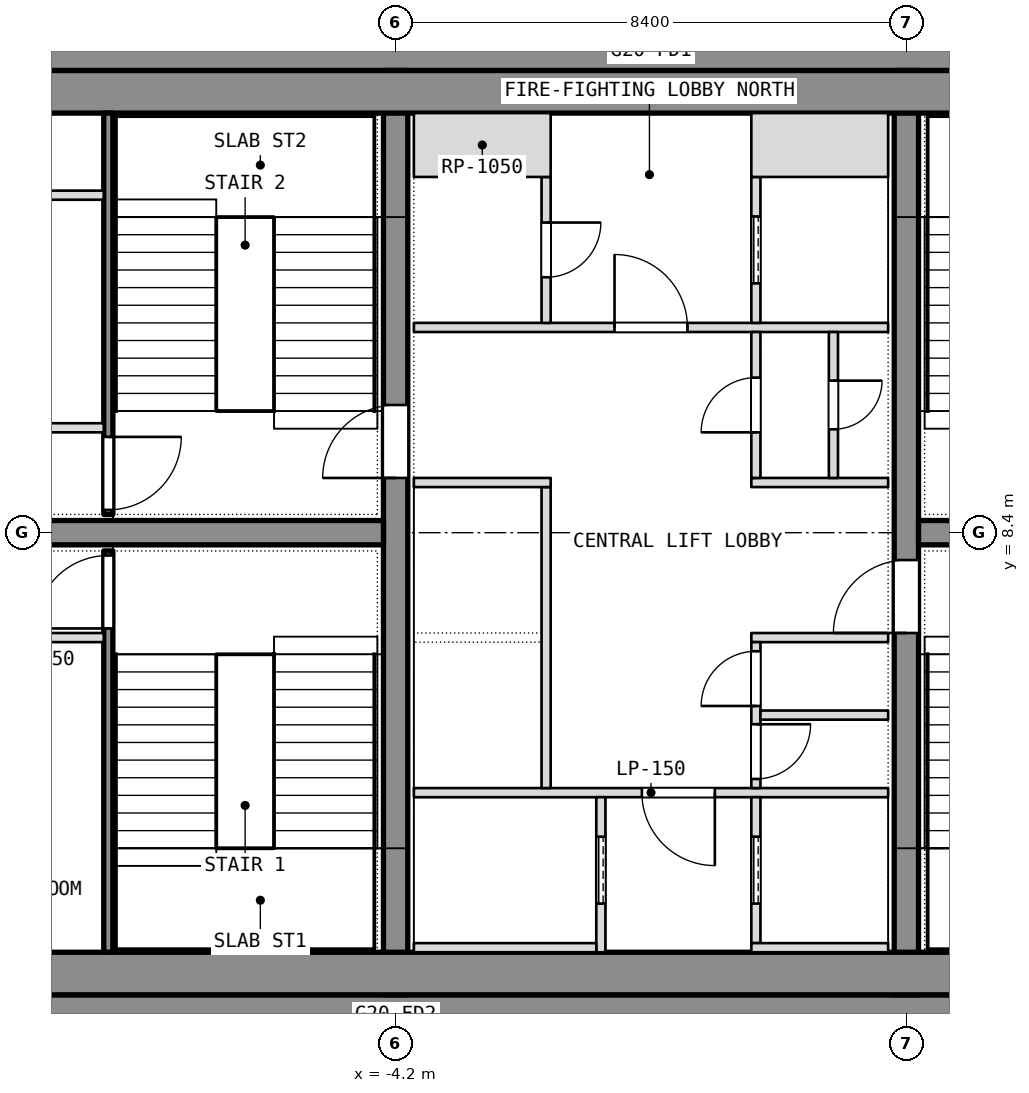
"""IFC4 building model, lengths in metres.
Left out: names, types, materials, properties, quantities, classifications, styles, units other than length and angle.
Written with IfcOpenShell. Run it as: python <this file> out.ifc"""

import sys

from ifc_helpers import new_model, si_unit, direction, frame, frame_2d, origin, place, context, subcontext, project, spatial, rectangle, extrude, element, fill, save


model = new_model("IFC4")
c1 = context("Model", 3, precision=1e-05, world=origin(), true_north=direction((0.0, 1.0)))
c2 = subcontext(c1, "Body", "Model", "MODEL_VIEW")
j1 = project(units=[si_unit("LENGTHUNIT", "METRE"), si_unit("PLANEANGLEUNIT", "RADIAN")], contexts=[c1])
p1 = place(None, origin())
s1 = spatial("IfcSite", under=j1, at=p1, CompositionType="ELEMENT")
p2 = place(p1, origin())
s2 = spatial("IfcBuilding", under=s1, at=p2, CompositionType="ELEMENT")
p3 = place(p2, frame((0.0, 0.0, 230.9)))
s3 = spatial("IfcBuildingStorey", under=s2, at=p3, CompositionType="ELEMENT", Elevation=230.9)
for number, where, z_axis, x_axis in (
    (1, (-11.1, 0.4, 0.0), (0.0, 0.0, 1.0), (1.0, 0.0, 0.0)),
    (2, (-11.1, 16.4, 0.0), (0.0, 0.0, 1.0), (1.0, 0.0, 0.0)),
):
    element("IfcWall", number, at=place(p3, frame(where, z_axis=z_axis, x_axis=x_axis)), inside=s3, PredefinedType="SHEAR", context=c2, shape_type="SweptSolid", body=[
        extrude(rectangle(XDim=22.2, YDim=0.8, at=frame_2d((11.1, 0.0))), origin(), (0.0, 0.0, 1.0), 3.6),
    ])
p4 = place(p3, frame((-4.2, 0.8, 0.0), z_axis=(0.0, 0.0, 1.0), x_axis=(0.0, 1.0, 0.0)))
e3 = element("IfcWall", 3, at=p4, inside=s3, PredefinedType="SHEAR", context=c2, shape_type="SweptSolid", body=[
    extrude(rectangle(XDim=15.2, YDim=0.4, at=frame_2d((7.6, 0.0))), origin(), (0.0, 0.0, 1.0), 3.6),
])
p5 = place(p4, frame((8.5, 0.0, 0.0)))
e4 = element("IfcOpeningElement", 4, at=p5, cuts=e3, PredefinedType="OPENING", context=c2, shape_type="SweptSolid", body=[
    extrude(rectangle(XDim=1.2, YDim=2.1, at=frame_2d((0.6, 1.05))), frame((0.0, 0.2, 0.0), z_axis=(0.0, -1.0, 0.0), x_axis=(1.0, 0.0, 0.0)), (0.0, 0.0, 1.0), 0.4),
])
p6 = place(p3, frame((4.2, 0.8, 0.0), z_axis=(0.0, 0.0, 1.0), x_axis=(0.0, 1.0, 0.0)))
e5 = element("IfcWall", 5, at=p6, inside=s3, PredefinedType="SHEAR", context=c2, shape_type="SweptSolid", body=[
    extrude(rectangle(XDim=15.2, YDim=0.4, at=frame_2d((7.6, 0.0))), origin(), (0.0, 0.0, 1.0), 3.6),
])
p7 = place(p6, frame((5.95, 0.0, 0.0)))
e6 = element("IfcOpeningElement", 6, at=p7, cuts=e5, PredefinedType="OPENING", context=c2, shape_type="SweptSolid", body=[
    extrude(rectangle(XDim=1.2, YDim=2.1, at=frame_2d((0.6, 1.05))), frame((0.0, 0.2, 0.0), z_axis=(0.0, -1.0, 0.0), x_axis=(1.0, 0.0, 0.0)), (0.0, 0.0, 1.0), 0.4),
])
for number, where, z_axis, x_axis in (
    (7, (-11.1, 8.4, 0.0), (0.0, 0.0, 1.0), (1.0, 0.0, 0.0)),
    (8, (4.4, 8.4, 0.0), (0.0, 0.0, 1.0), (1.0, 0.0, 0.0)),
):
    element("IfcWall", number, at=place(p3, frame(where, z_axis=z_axis, x_axis=x_axis)), inside=s3, PredefinedType="SHEAR", context=c2, shape_type="SweptSolid", body=[
        extrude(rectangle(XDim=6.7, YDim=0.4, at=frame_2d((3.35, 0.0))), origin(), (0.0, 0.0, 1.0), 3.6),
    ])
for number, where, z_axis, x_axis in (
    (9, (-11.1, 1.15, 0.0), (0.0, 0.0, 1.0), (1.0, 0.0, 0.0)),
    (10, (-11.1, 15.65, 0.0), (0.0, 0.0, 1.0), (1.0, 0.0, 0.0)),
):
    element("IfcWall", number, at=place(p3, frame(where, z_axis=z_axis, x_axis=x_axis)), inside=s3, PredefinedType="PARTITIONING", context=c2, shape_type="SweptSolid", body=[
        extrude(rectangle(XDim=22.2, YDim=0.7, at=frame_2d((11.1, 0.0))), origin(), (0.0, 0.0, 1.0), 3.34),
    ])
p8 = place(p3, frame((-8.925, 1.5, 0.0), z_axis=(0.0, 0.0, 1.0), x_axis=(0.0, 1.0, 0.0)))
e11 = element("IfcWall", 11, at=p8, inside=s3, PredefinedType="SHEAR", context=c2, shape_type="SweptSolid", body=[
    extrude(rectangle(XDim=6.6, YDim=0.15, at=frame_2d((3.3, 0.0))), origin(), (0.0, 0.0, 1.0), 3.34),
])
p9 = place(p8, frame((5.325, 0.0, 0.0)))
e12 = element("IfcOpeningElement", 12, at=p9, cuts=e11, PredefinedType="OPENING", context=c2, shape_type="SweptSolid", body=[
    extrude(rectangle(XDim=1.2, YDim=2.1, at=frame_2d((0.6, 1.05))), frame((0.0, 0.075, 0.0), z_axis=(0.0, -1.0, 0.0), x_axis=(1.0, 0.0, 0.0)), (0.0, 0.0, 1.0), 0.15),
])
p10 = place(p3, frame((-11.1, 6.675, 0.0), z_axis=(0.0, 0.0, 1.0), x_axis=(1.0, 0.0, 0.0)))
e13 = element("IfcWall", 13, at=p10, inside=s3, PredefinedType="PARTITIONING", context=c2, shape_type="SweptSolid", body=[
    extrude(rectangle(XDim=2.1, YDim=0.15, at=frame_2d((1.05, 0.0))), origin(), (0.0, 0.0, 1.0), 3.34),
])
p11 = place(p3, frame((-8.925, 8.7, 0.0), z_axis=(0.0, 0.0, 1.0), x_axis=(0.0, 1.0, 0.0)))
e14 = element("IfcWall", 14, at=p11, inside=s3, PredefinedType="SHEAR", context=c2, shape_type="SweptSolid", body=[
    extrude(rectangle(XDim=6.6, YDim=0.15, at=frame_2d((3.3, 0.0))), origin(), (0.0, 0.0, 1.0), 3.34),
])
p12 = place(p11, frame((0.075, 0.0, 0.0)))
e15 = element("IfcOpeningElement", 15, at=p12, cuts=e14, PredefinedType="OPENING", context=c2, shape_type="SweptSolid", body=[
    extrude(rectangle(XDim=1.2, YDim=2.1, at=frame_2d((0.6, 1.05))), frame((0.0, 0.075, 0.0), z_axis=(0.0, -1.0, 0.0), x_axis=(1.0, 0.0, 0.0)), (0.0, 0.0, 1.0), 0.15),
])
for number, where, z_axis, x_axis in (
    (16, (-11.1, 10.125, 0.0), (0.0, 0.0, 1.0), (1.0, 0.0, 0.0)),
    (17, (-11.1, 13.95, 0.0), (0.0, 0.0, 1.0), (1.0, 0.0, 0.0)),
):
    element("IfcWall", number, at=place(p3, frame(where, z_axis=z_axis, x_axis=x_axis)), inside=s3, PredefinedType="PARTITIONING", context=c2, shape_type="SweptSolid", body=[
        extrude(rectangle(XDim=2.1, YDim=0.15, at=frame_2d((1.05, 0.0))), origin(), (0.0, 0.0, 1.0), 3.34),
    ])
p13 = place(p3, frame((-3.9, 4.125, 0.0), z_axis=(0.0, 0.0, 1.0), x_axis=(1.0, 0.0, 0.0)))
e18 = element("IfcWall", 18, at=p13, inside=s3, PredefinedType="PARTITIONING", context=c2, shape_type="SweptSolid", body=[
    extrude(rectangle(XDim=7.8, YDim=0.15, at=frame_2d((3.9, 0.0))), origin(), (0.0, 0.0, 1.0), 3.34),
])
p14 = place(p13, frame((3.75, 0.0, 0.0)))
e19 = element("IfcOpeningElement", 19, at=p14, cuts=e18, PredefinedType="OPENING", context=c2, shape_type="SweptSolid", body=[
    extrude(rectangle(XDim=1.2, YDim=2.1, at=frame_2d((0.6, 1.05))), frame((0.0, 0.075, 0.0), z_axis=(0.0, -1.0, 0.0), x_axis=(1.0, 0.0, 0.0)), (0.0, 0.0, 1.0), 0.15),
])
p15 = place(p3, frame((-3.9, 11.775, 0.0), z_axis=(0.0, 0.0, 1.0), x_axis=(1.0, 0.0, 0.0)))
e20 = element("IfcWall", 20, at=p15, inside=s3, PredefinedType="PARTITIONING", context=c2, shape_type="SweptSolid", body=[
    extrude(rectangle(XDim=7.8, YDim=0.15, at=frame_2d((3.9, 0.0))), origin(), (0.0, 0.0, 1.0), 3.34),
])
p16 = place(p15, frame((3.3, 0.0, 0.0)))
e21 = element("IfcOpeningElement", 21, at=p16, cuts=e20, PredefinedType="OPENING", context=c2, shape_type="SweptSolid", body=[
    extrude(rectangle(XDim=1.2, YDim=2.1, at=frame_2d((0.6, 1.05))), frame((0.0, 0.075, 0.0), z_axis=(0.0, -1.0, 0.0), x_axis=(1.0, 0.0, 0.0)), (0.0, 0.0, 1.0), 0.15),
])
p17 = place(p3, frame((-0.825, 1.5, 0.0), z_axis=(0.0, 0.0, 1.0), x_axis=(0.0, 1.0, 0.0)))
e22 = element("IfcWall", 22, at=p17, inside=s3, PredefinedType="SHEAR", context=c2, shape_type="SweptSolid", body=[
    extrude(rectangle(XDim=2.55, YDim=0.15, at=frame_2d((1.275, 0.0))), origin(), (0.0, 0.0, 1.0), 3.6),
])
p18 = place(p17, frame((0.8, 0.0, 0.0)))
e23 = element("IfcOpeningElement", 23, at=p18, cuts=e22, PredefinedType="OPENING", context=c2, shape_type="SweptSolid", body=[
    extrude(rectangle(XDim=1.1, YDim=2.1, at=frame_2d((0.55, 1.05))), frame((0.0, 0.075, 0.0), z_axis=(0.0, -1.0, 0.0), x_axis=(1.0, 0.0, 0.0)), (0.0, 0.0, 1.0), 0.15),
])
p19 = place(p3, frame((-3.9, 1.575, 0.0), z_axis=(0.0, 0.0, 1.0), x_axis=(1.0, 0.0, 0.0)))
e24 = element("IfcWall", 24, at=p19, inside=s3, PredefinedType="SHEAR", context=c2, shape_type="SweptSolid", body=[
    extrude(rectangle(XDim=3.0, YDim=0.15, at=frame_2d((1.5, 0.0))), origin(), (0.0, 0.0, 1.0), 3.6),
])
p20 = place(p3, frame((-1.725, 4.2, 0.0), z_axis=(0.0, 0.0, 1.0), x_axis=(0.0, 1.0, 0.0)))
e25 = element("IfcWall", 25, at=p20, inside=s3, PredefinedType="SHEAR", context=c2, shape_type="SweptSolid", body=[
    extrude(rectangle(XDim=4.95, YDim=0.15, at=frame_2d((2.475, 0.0))), origin(), (0.0, 0.0, 1.0), 3.6),
])
p21 = place(p3, frame((-3.9, 9.225, 0.0), z_axis=(0.0, 0.0, 1.0), x_axis=(1.0, 0.0, 0.0)))
e26 = element("IfcWall", 26, at=p21, inside=s3, PredefinedType="SHEAR", context=c2, shape_type="SweptSolid", body=[
    extrude(rectangle(XDim=2.25, YDim=0.15, at=frame_2d((1.125, 0.0))), origin(), (0.0, 0.0, 1.0), 3.6),
])
p22 = place(p3, frame((-1.725, 11.85, 0.0), z_axis=(0.0, 0.0, 1.0), x_axis=(0.0, 1.0, 0.0)))
e27 = element("IfcWall", 27, at=p22, inside=s3, PredefinedType="PARTITIONING", context=c2, shape_type="SweptSolid", body=[
    extrude(rectangle(XDim=2.4, YDim=0.15, at=frame_2d((1.2, 0.0))), origin(), (0.0, 0.0, 1.0), 3.34),
])
p23 = place(p22, frame((0.75, 0.0, 0.0)))
e28 = element("IfcOpeningElement", 28, at=p23, cuts=e27, PredefinedType="OPENING", context=c2, shape_type="SweptSolid", body=[
    extrude(rectangle(XDim=0.9, YDim=2.1, at=frame_2d((0.45, 1.05))), frame((0.0, 0.075, 0.0), z_axis=(0.0, -1.0, 0.0), x_axis=(1.0, 0.0, 0.0)), (0.0, 0.0, 1.0), 0.15),
])
p24 = place(p3, frame((-3.9, 14.775, 0.0), z_axis=(0.0, 0.0, 1.0), x_axis=(1.0, 0.0, 0.0)))
e29 = element("IfcWall", 29, at=p24, inside=s3, PredefinedType="PARTITIONING", context=c2, shape_type="SweptSolid", body=[
    extrude(rectangle(XDim=2.25, YDim=1.05, at=frame_2d((1.125, 0.0))), origin(), (0.0, 0.0, 1.0), 3.34),
])
p25 = place(p3, frame((1.725, 1.65, 0.0), z_axis=(0.0, 0.0, 1.0), x_axis=(0.0, 1.0, 0.0)))
e30 = element("IfcWall", 30, at=p25, inside=s3, PredefinedType="SHEAR", context=c2, shape_type="SweptSolid", body=[
    extrude(rectangle(XDim=2.4, YDim=0.15, at=frame_2d((1.2, 0.0))), origin(), (0.0, 0.0, 1.0), 3.6),
])
p26 = place(p25, frame((0.65, 0.0, 0.0)))
e31 = element("IfcOpeningElement", 31, at=p26, cuts=e30, PredefinedType="OPENING", context=c2, shape_type="SweptSolid", body=[
    extrude(rectangle(XDim=1.1, YDim=2.1, at=frame_2d((0.55, 1.05))), frame((0.0, 0.075, 0.0), z_axis=(0.0, -1.0, 0.0), x_axis=(1.0, 0.0, 0.0)), (0.0, 0.0, 1.0), 0.15),
])
p27 = place(p3, frame((1.65, 1.575, 0.0), z_axis=(0.0, 0.0, 1.0), x_axis=(1.0, 0.0, 0.0)))
e32 = element("IfcWall", 32, at=p27, inside=s3, PredefinedType="SHEAR", context=c2, shape_type="SweptSolid", body=[
    extrude(rectangle(XDim=2.25, YDim=0.15, at=frame_2d((1.125, 0.0))), origin(), (0.0, 0.0, 1.0), 3.6),
])
p28 = place(p3, frame((1.725, 11.85, 0.0), z_axis=(0.0, 0.0, 1.0), x_axis=(0.0, 1.0, 0.0)))
e33 = element("IfcWall", 33, at=p28, inside=s3, PredefinedType="SHEAR", context=c2, shape_type="SweptSolid", body=[
    extrude(rectangle(XDim=2.4, YDim=0.15, at=frame_2d((1.2, 0.0))), origin(), (0.0, 0.0, 1.0), 3.6),
])
p29 = place(p28, frame((0.65, 0.0, 0.0)))
e34 = element("IfcOpeningElement", 34, at=p29, cuts=e33, PredefinedType="OPENING", context=c2, shape_type="SweptSolid", body=[
    extrude(rectangle(XDim=1.1, YDim=2.1, at=frame_2d((0.55, 1.05))), frame((0.0, 0.075, 0.0), z_axis=(0.0, -1.0, 0.0), x_axis=(1.0, 0.0, 0.0)), (0.0, 0.0, 1.0), 0.15),
])
p30 = place(p3, frame((1.65, 14.775, 0.0), z_axis=(0.0, 0.0, 1.0), x_axis=(1.0, 0.0, 0.0)))
e35 = element("IfcWall", 35, at=p30, inside=s3, PredefinedType="SHEAR", context=c2, shape_type="SweptSolid", body=[
    extrude(rectangle(XDim=2.25, YDim=1.05, at=frame_2d((1.125, 0.0))), origin(), (0.0, 0.0, 1.0), 3.6),
])
for number, where, z_axis, x_axis in (
    (36, (1.65, 6.675, 0.0), (0.0, 0.0, 1.0), (1.0, 0.0, 0.0)),
    (37, (1.65, 9.225, 0.0), (0.0, 0.0, 1.0), (1.0, 0.0, 0.0)),
):
    element("IfcWall", number, at=place(p3, frame(where, z_axis=z_axis, x_axis=x_axis)), inside=s3, PredefinedType="PARTITIONING", context=c2, shape_type="SweptSolid", body=[
        extrude(rectangle(XDim=2.25, YDim=0.15, at=frame_2d((1.125, 0.0))), origin(), (0.0, 0.0, 1.0), 3.34),
    ])
p31 = place(p3, frame((1.725, 4.2, 0.0), z_axis=(0.0, 0.0, 1.0), x_axis=(0.0, 1.0, 0.0)))
e38 = element("IfcWall", 38, at=p31, inside=s3, PredefinedType="PARTITIONING", context=c2, shape_type="SweptSolid", body=[
    extrude(rectangle(XDim=2.4, YDim=0.15, at=frame_2d((1.2, 0.0))), origin(), (0.0, 0.0, 1.0), 3.34),
])
p32 = place(p31, frame((0.15, 0.0, 0.0)))
e39 = element("IfcOpeningElement", 39, at=p32, cuts=e38, PredefinedType="OPENING", context=c2, shape_type="SweptSolid", body=[
    extrude(rectangle(XDim=0.9, YDim=2.1, at=frame_2d((0.45, 1.05))), frame((0.0, 0.075, 0.0), z_axis=(0.0, -1.0, 0.0), x_axis=(1.0, 0.0, 0.0)), (0.0, 0.0, 1.0), 0.15),
])
p33 = place(p31, frame((1.35, 0.0, 0.0)))
e40 = element("IfcOpeningElement", 40, at=p33, cuts=e38, PredefinedType="OPENING", context=c2, shape_type="SweptSolid", body=[
    extrude(rectangle(XDim=0.9, YDim=2.1, at=frame_2d((0.45, 1.05))), frame((0.0, 0.075, 0.0), z_axis=(0.0, -1.0, 0.0), x_axis=(1.0, 0.0, 0.0)), (0.0, 0.0, 1.0), 0.15),
])
p34 = place(p3, frame((1.725, 9.3, 0.0), z_axis=(0.0, 0.0, 1.0), x_axis=(0.0, 1.0, 0.0)))
e41 = element("IfcWall", 41, at=p34, inside=s3, PredefinedType="PARTITIONING", context=c2, shape_type="SweptSolid", body=[
    extrude(rectangle(XDim=2.4, YDim=0.15, at=frame_2d((1.2, 0.0))), origin(), (0.0, 0.0, 1.0), 3.34),
])
p35 = place(p34, frame((0.75, 0.0, 0.0)))
e42 = element("IfcOpeningElement", 42, at=p35, cuts=e41, PredefinedType="OPENING", context=c2, shape_type="SweptSolid", body=[
    extrude(rectangle(XDim=0.9, YDim=2.1, at=frame_2d((0.45, 1.05))), frame((0.0, 0.075, 0.0), z_axis=(0.0, -1.0, 0.0), x_axis=(1.0, 0.0, 0.0)), (0.0, 0.0, 1.0), 0.15),
])
p36 = place(p3, frame((1.8, 5.4, 0.0), z_axis=(0.0, 0.0, 1.0), x_axis=(1.0, 0.0, 0.0)))
e43 = element("IfcWall", 43, at=p36, inside=s3, PredefinedType="PARTITIONING", context=c2, shape_type="SweptSolid", body=[
    extrude(rectangle(XDim=2.1, YDim=0.15, at=frame_2d((1.05, 0.0))), origin(), (0.0, 0.0, 1.0), 3.34),
])
p37 = place(p3, frame((3.0, 9.3, 0.0), z_axis=(0.0, 0.0, 1.0), x_axis=(0.0, 1.0, 0.0)))
e44 = element("IfcWall", 44, at=p37, inside=s3, PredefinedType="PARTITIONING", context=c2, shape_type="SweptSolid", body=[
    extrude(rectangle(XDim=2.4, YDim=0.15, at=frame_2d((1.2, 0.0))), origin(), (0.0, 0.0, 1.0), 3.34),
])
p38 = place(p37, frame((0.8, 0.0, 0.0)))
e45 = element("IfcOpeningElement", 45, at=p38, cuts=e44, PredefinedType="OPENING", context=c2, shape_type="SweptSolid", body=[
    extrude(rectangle(XDim=0.8, YDim=2.1, at=frame_2d((0.4, 1.05))), frame((0.0, 0.075, 0.0), z_axis=(0.0, -1.0, 0.0), x_axis=(1.0, 0.0, 0.0)), (0.0, 0.0, 1.0), 0.15),
])
p39 = place(p9, origin())
e46 = element("IfcDoor", 46, at=p39, inside=s3, OperationType="SINGLE_SWING_LEFT", PredefinedType="DOOR", context=c2, shape_type="SweptSolid", body=[
    extrude(rectangle(XDim=1.2, YDim=2.1, at=frame_2d((0.6, 1.05))), frame((0.0, 0.025, 0.0), z_axis=(0.0, -1.0, 0.0), x_axis=(1.0, 0.0, 0.0)), (0.0, 0.0, 1.0), 0.05),
])
fill(e12, e46)
p40 = place(p12, origin())
e47 = element("IfcDoor", 47, at=p40, inside=s3, OperationType="SINGLE_SWING_LEFT", PredefinedType="DOOR", context=c2, shape_type="SweptSolid", body=[
    extrude(rectangle(XDim=1.2, YDim=2.1, at=frame_2d((0.6, 1.05))), frame((0.0, 0.025, 0.0), z_axis=(0.0, -1.0, 0.0), x_axis=(1.0, 0.0, 0.0)), (0.0, 0.0, 1.0), 0.05),
])
fill(e15, e47)
p41 = place(p32, origin())
e48 = element("IfcDoor", 48, at=p41, inside=s3, OperationType="SINGLE_SWING_LEFT", PredefinedType="DOOR", context=c2, shape_type="SweptSolid", body=[
    extrude(rectangle(XDim=0.9, YDim=2.1, at=frame_2d((0.45, 1.05))), frame((0.0, 0.025, 0.0), z_axis=(0.0, -1.0, 0.0), x_axis=(1.0, 0.0, 0.0)), (0.0, 0.0, 1.0), 0.05),
])
fill(e39, e48)
p42 = place(p33, origin())
e49 = element("IfcDoor", 49, at=p42, inside=s3, OperationType="SINGLE_SWING_LEFT", PredefinedType="DOOR", context=c2, shape_type="SweptSolid", body=[
    extrude(rectangle(XDim=0.9, YDim=2.1, at=frame_2d((0.45, 1.05))), frame((0.0, 0.025, 0.0), z_axis=(0.0, -1.0, 0.0), x_axis=(1.0, 0.0, 0.0)), (0.0, 0.0, 1.0), 0.05),
])
fill(e40, e49)
p43 = place(p35, origin())
e50 = element("IfcDoor", 50, at=p43, inside=s3, OperationType="SINGLE_SWING_LEFT", PredefinedType="DOOR", context=c2, shape_type="SweptSolid", body=[
    extrude(rectangle(XDim=0.9, YDim=2.1, at=frame_2d((0.45, 1.05))), frame((0.0, 0.025, 0.0), z_axis=(0.0, -1.0, 0.0), x_axis=(1.0, 0.0, 0.0)), (0.0, 0.0, 1.0), 0.05),
])
fill(e42, e50)
p44 = place(p38, origin())
e51 = element("IfcDoor", 51, at=p44, inside=s3, OperationType="SINGLE_SWING_LEFT", PredefinedType="DOOR", context=c2, shape_type="SweptSolid", body=[
    extrude(rectangle(XDim=0.8, YDim=2.1, at=frame_2d((0.4, 1.05))), frame((0.0, 0.025, 0.0), z_axis=(0.0, -1.0, 0.0), x_axis=(1.0, 0.0, 0.0)), (0.0, 0.0, 1.0), 0.05),
])
fill(e45, e51)
p45 = place(p18, origin())
e52 = element("IfcDoor", 52, at=p45, inside=s3, OperationType="SLIDING_TO_LEFT", PredefinedType="DOOR", context=c2, shape_type="SweptSolid", body=[
    extrude(rectangle(XDim=1.1, YDim=2.1, at=frame_2d((0.55, 1.05))), frame((0.0, 0.025, 0.0), z_axis=(0.0, -1.0, 0.0), x_axis=(1.0, 0.0, 0.0)), (0.0, 0.0, 1.0), 0.05),
])
fill(e23, e52)
p46 = place(p26, origin())
e53 = element("IfcDoor", 53, at=p46, inside=s3, OperationType="SLIDING_TO_LEFT", PredefinedType="DOOR", context=c2, shape_type="SweptSolid", body=[
    extrude(rectangle(XDim=1.1, YDim=2.1, at=frame_2d((0.55, 1.05))), frame((0.0, 0.025, 0.0), z_axis=(0.0, -1.0, 0.0), x_axis=(1.0, 0.0, 0.0)), (0.0, 0.0, 1.0), 0.05),
])
fill(e31, e53)
p47 = place(p29, origin())
e54 = element("IfcDoor", 54, at=p47, inside=s3, OperationType="SLIDING_TO_LEFT", PredefinedType="DOOR", context=c2, shape_type="SweptSolid", body=[
    extrude(rectangle(XDim=1.1, YDim=2.1, at=frame_2d((0.55, 1.05))), frame((0.0, 0.025, 0.0), z_axis=(0.0, -1.0, 0.0), x_axis=(1.0, 0.0, 0.0)), (0.0, 0.0, 1.0), 0.05),
])
fill(e34, e54)
p48 = place(p14, origin())
e55 = element("IfcDoor", 55, at=p48, inside=s3, OperationType="SINGLE_SWING_LEFT", PredefinedType="DOOR", context=c2, shape_type="SweptSolid", body=[
    extrude(rectangle(XDim=1.2, YDim=2.1, at=frame_2d((0.6, 1.05))), frame((0.0, 0.025, 0.0), z_axis=(0.0, -1.0, 0.0), x_axis=(1.0, 0.0, 0.0)), (0.0, 0.0, 1.0), 0.05),
])
fill(e19, e55)
p49 = place(p16, origin())
e56 = element("IfcDoor", 56, at=p49, inside=s3, OperationType="SINGLE_SWING_LEFT", PredefinedType="DOOR", context=c2, shape_type="SweptSolid", body=[
    extrude(rectangle(XDim=1.2, YDim=2.1, at=frame_2d((0.6, 1.05))), frame((0.0, 0.025, 0.0), z_axis=(0.0, -1.0, 0.0), x_axis=(1.0, 0.0, 0.0)), (0.0, 0.0, 1.0), 0.05),
])
fill(e21, e56)
p50 = place(p23, origin())
e57 = element("IfcDoor", 57, at=p50, inside=s3, OperationType="SINGLE_SWING_LEFT", PredefinedType="DOOR", context=c2, shape_type="SweptSolid", body=[
    extrude(rectangle(XDim=0.9, YDim=2.1, at=frame_2d((0.45, 1.05))), frame((0.0, 0.025, 0.0), z_axis=(0.0, -1.0, 0.0), x_axis=(1.0, 0.0, 0.0)), (0.0, 0.0, 1.0), 0.05),
])
fill(e28, e57)
p51 = place(p5, origin())
e58 = element("IfcDoor", 58, at=p51, inside=s3, OperationType="SINGLE_SWING_LEFT", PredefinedType="DOOR", context=c2, shape_type="SweptSolid", body=[
    extrude(rectangle(XDim=1.2, YDim=2.1, at=frame_2d((0.6, 1.05))), frame((0.0, 0.025, 0.0), z_axis=(0.0, -1.0, 0.0), x_axis=(1.0, 0.0, 0.0)), (0.0, 0.0, 1.0), 0.05),
])
fill(e4, e58)
p52 = place(p7, origin())
e59 = element("IfcDoor", 59, at=p52, inside=s3, OperationType="SINGLE_SWING_LEFT", PredefinedType="DOOR", context=c2, shape_type="SweptSolid", body=[
    extrude(rectangle(XDim=1.2, YDim=2.1, at=frame_2d((0.6, 1.05))), frame((0.0, 0.025, 0.0), z_axis=(0.0, -1.0, 0.0), x_axis=(1.0, 0.0, 0.0)), (0.0, 0.0, 1.0), 0.05),
])
fill(e6, e59)
save(model, sys.argv[1])
